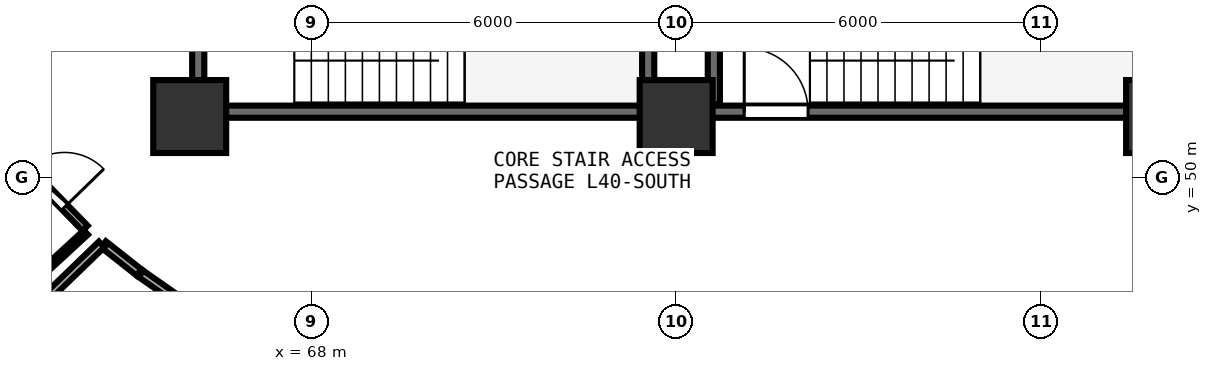
"""IFC4 building model, lengths in metres.
Left out: names, types, materials, properties, quantities, classifications, styles, units other than length and angle.
Written with IfcOpenShell. Run it as: python <this file> out.ifc"""

import sys

from ifc_helpers import new_model, si_unit, direction, frame, frame_2d, origin, origin_2d, place, context, subcontext, project, spatial, rectangle, extrude, element, fill, save


model = new_model("IFC4")
c1 = context("Model", 3, precision=1e-05, world=origin(), true_north=direction((0.0, 1.0)))
c2 = subcontext(c1, "Body", "Model", "MODEL_VIEW")
j1 = project(units=[si_unit("LENGTHUNIT", "METRE"), si_unit("PLANEANGLEUNIT", "RADIAN")], contexts=[c1])
p1 = place(None, origin())
s1 = spatial("IfcSite", under=j1, at=p1, CompositionType="ELEMENT")
p2 = place(p1, origin())
s2 = spatial("IfcBuilding", under=s1, at=p2, CompositionType="ELEMENT")
p3 = place(p2, frame((0.0, 0.0, 158.1)))
s3 = spatial("IfcBuildingStorey", under=s2, at=p3, CompositionType="ELEMENT", Elevation=158.1)
for number, where, z_axis, x_axis in (
    (1, (66.0, 51.0, 0.0), (0.0, 0.0, 1.0), (1.0, 0.0, 0.0)),
    (2, (74.0, 51.0, 0.0), (0.0, 0.0, 1.0), (1.0, 0.0, 0.0)),
    (3, (82.0, 51.0, 0.0), (0.0, 0.0, 1.0), (1.0, 0.0, 0.0)),
):
    element("IfcColumn", number, at=place(p3, frame(where, z_axis=z_axis, x_axis=x_axis)), inside=s3, PredefinedType="PILASTER", context=c2, shape_type="SweptSolid", body=[
        extrude(rectangle(XDim=1.2, YDim=1.2, at=origin_2d()), origin(), (0.0, 0.0, 1.0), 3.75),
    ])
p4 = place(p3, frame((74.0, 51.08, 0.0), z_axis=(0.0, 0.0, 1.0), x_axis=(1.0, 0.0, 0.0)))
e4 = element("IfcWall", 4, at=p4, inside=s3, PredefinedType="SHEAR", context=c2, shape_type="SweptSolid", body=[
    extrude(rectangle(XDim=7.9, YDim=0.2, at=frame_2d((3.95, 0.0))), origin(), (0.0, 0.0, 1.0), 3.49),
])
p5 = place(p4, frame((1.12, 0.0, 0.0)))
e5 = element("IfcOpeningElement", 5, at=p5, cuts=e4, PredefinedType="OPENING", context=c2, shape_type="SweptSolid", body=[
    extrude(rectangle(XDim=1.05, YDim=2.1, at=frame_2d((0.525, 1.05))), frame((0.0, 0.11, 0.0), z_axis=(0.0, -1.0, 0.0), x_axis=(1.0, 0.0, 0.0)), (0.0, 0.0, 1.0), 0.22),
])
p6 = place(p3, frame((74.62, 54.27, 0.0), z_axis=(0.0, 0.0, 1.0), x_axis=(0.0, -1.0, 0.0)))
e6 = element("IfcWall", 6, at=p6, inside=s3, PredefinedType="SHEAR", context=c2, shape_type="SweptSolid", body=[
    extrude(rectangle(XDim=3.07, YDim=0.2, at=frame_2d((1.535, 0.0))), origin(), (0.0, 0.0, 1.0), 3.49),
])
p7 = place(p3, frame((66.26, 51.08, 0.0), z_axis=(0.0, 0.0, 1.0), x_axis=(1.0, 0.0, 0.0)))
e7 = element("IfcWall", 7, at=p7, inside=s3, PredefinedType="SHEAR", context=c2, shape_type="SweptSolid", body=[
    extrude(rectangle(XDim=7.16, YDim=0.2, at=frame_2d((3.58, 0.0))), origin(), (0.0, 0.0, 1.0), 3.49),
])
p8 = place(p3, frame((73.54, 51.2, 0.0), z_axis=(0.0, 0.0, 1.0), x_axis=(0.0, 1.0, 0.0)))
e8 = element("IfcWall", 8, at=p8, inside=s3, PredefinedType="SHEAR", context=c2, shape_type="SweptSolid", body=[
    extrude(rectangle(XDim=3.07, YDim=0.2, at=frame_2d((1.535, 0.0))), origin(), (0.0, 0.0, 1.0), 3.49),
])
p9 = place(p3, frame((66.14, 54.27, 0.0), z_axis=(0.0, 0.0, 1.0), x_axis=(0.0, -1.0, 0.0)))
e9 = element("IfcWall", 9, at=p9, inside=s3, PredefinedType="SHEAR", context=c2, shape_type="SweptSolid", body=[
    extrude(rectangle(XDim=3.07, YDim=0.2, at=frame_2d((1.535, 0.0))), origin(), (0.0, 0.0, 1.0), 3.49),
])
p10 = place(p9, frame((1.01, 0.0, 0.0)))
e10 = element("IfcOpeningElement", 10, at=p10, cuts=e9, PredefinedType="OPENING", context=c2, shape_type="SweptSolid", body=[
    extrude(rectangle(XDim=1.05, YDim=2.1, at=frame_2d((0.525, 1.05))), frame((0.0, 0.11, 0.0), z_axis=(0.0, -1.0, 0.0), x_axis=(1.0, 0.0, 0.0)), (0.0, 0.0, 1.0), 0.22),
])
p11 = place(p3, frame((62.977, 50.5, 0.0), z_axis=(0.0, 0.0, 1.0), x_axis=(0.69801962686, -0.71607862733, 0.0)))
e11 = element("IfcWall", 11, at=p11, inside=s3, PredefinedType="PARTITIONING", context=c2, shape_type="SweptSolid", body=[
    extrude(rectangle(XDim=1.866, YDim=0.12, at=frame_2d((0.933, 0.0))), origin(), (0.0, 0.0, 1.0), 2.975),
])
p12 = place(p11, frame((0.483, 0.0, 0.0)))
e12 = element("IfcOpeningElement", 12, at=p12, cuts=e11, PredefinedType="OPENING", context=c2, shape_type="SweptSolid", body=[
    extrude(rectangle(XDim=0.9, YDim=2.08, at=frame_2d((0.45, 1.04))), frame((0.0, 0.07, 0.0), z_axis=(0.0, -1.0, 0.0), x_axis=(1.0, 0.0, 0.0)), (0.0, 0.0, 1.0), 0.14),
])
p13 = place(p3, frame((64.292, 49.094, 0.0), z_axis=(0.0, 0.0, 1.0), x_axis=(-0.73529828134, -0.677743636973, 0.0)))
e13 = element("IfcWall", 13, at=p13, inside=s3, PredefinedType="PARTITIONING", context=c2, shape_type="SweptSolid", body=[
    extrude(rectangle(XDim=7.771, YDim=0.1, at=frame_2d((3.886, 0.0))), origin(), (0.0, 0.0, 1.0), 3.025),
])
p14 = place(p3, frame((64.581, 48.899, 0.0), z_axis=(0.0, 0.0, 1.0), x_axis=(0.785042223167, -0.619442255456, 0.0)))
e14 = element("IfcWall", 14, at=p14, inside=s3, PredefinedType="PLUMBINGWALL", context=c2, shape_type="SweptSolid", body=[
    extrude(rectangle(XDim=0.745, YDim=0.13, at=frame_2d((0.372, 0.0))), origin(), (0.0, 0.0, 1.0), 2.975),
])
p15 = place(p3, frame((65.198, 48.414, 0.0), z_axis=(0.0, 0.0, 1.0), x_axis=(0.819339212877, -0.573309039038, 0.0)))
e15 = element("IfcWall", 15, at=p15, inside=s3, PredefinedType="PLUMBINGWALL", context=c2, shape_type="SweptSolid", body=[
    extrude(rectangle(XDim=0.748, YDim=0.13, at=frame_2d((0.374, 0.0))), origin(), (0.0, 0.0, 1.0), 2.975),
])
p16 = place(p3, frame((62.581, 46.994, 0.0), z_axis=(0.0, 0.0, 1.0), x_axis=(0.719038860306, 0.694969867958, 0.0)))
e16 = element("IfcWall", 16, at=p16, inside=s3, PredefinedType="PLUMBINGWALL", context=c2, shape_type="SweptSolid", body=[
    extrude(rectangle(XDim=2.739, YDim=0.13, at=frame_2d((1.369, 0.0))), origin(), (0.0, 0.0, 1.0), 3.235),
])
p17 = place(p5, origin())
e17 = element("IfcDoor", 17, at=p17, inside=s3, OperationType="SINGLE_SWING_LEFT", PredefinedType="DOOR", context=c2, shape_type="SweptSolid", body=[
    extrude(rectangle(XDim=1.05, YDim=2.1, at=frame_2d((0.525, 1.05))), frame((0.0, 0.025, 0.0), z_axis=(0.0, -1.0, 0.0), x_axis=(1.0, 0.0, 0.0)), (0.0, 0.0, 1.0), 0.05),
])
fill(e5, e17)
p18 = place(p12, origin())
e18 = element("IfcDoor", 18, at=p18, inside=s3, OperationType="SINGLE_SWING_RIGHT", PredefinedType="DOOR", context=c2, shape_type="SweptSolid", body=[
    extrude(rectangle(XDim=0.9, YDim=2.08, at=frame_2d((0.45, 1.04))), frame((0.0, 0.025, 0.0), z_axis=(0.0, -1.0, 0.0), x_axis=(1.0, 0.0, 0.0)), (0.0, 0.0, 1.0), 0.05),
])
fill(e12, e18)
save(model, sys.argv[1])
